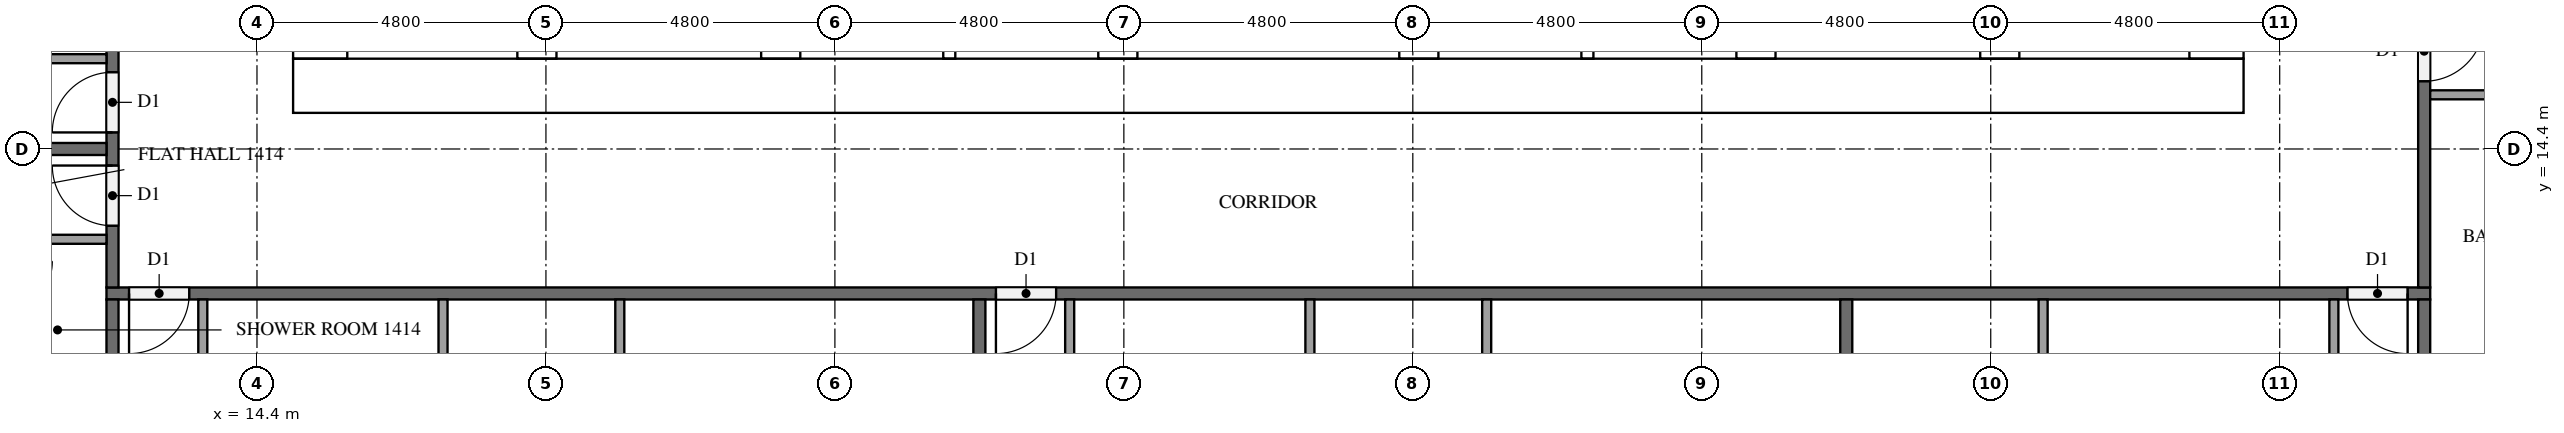
"""IFC4 building model, lengths in metres.
Left out: names, types, materials, properties, quantities, classifications, styles, units other than length and angle.
Written with IfcOpenShell. Run it as: python <this file> out.ifc"""

import sys

from ifc_helpers import new_model, si_unit, direction, frame, frame_2d, origin, place, context, subcontext, project, spatial, rectangle, extrude, element, fill, save


model = new_model("IFC4")
c1 = context("Model", 3, precision=1e-05, world=origin(), true_north=direction((0.0, 1.0)))
c2 = subcontext(c1, "Body", "Model", "MODEL_VIEW")
j1 = project(units=[si_unit("LENGTHUNIT", "METRE"), si_unit("PLANEANGLEUNIT", "RADIAN")], contexts=[c1])
p1 = place(None, origin())
s1 = spatial("IfcSite", under=j1, at=p1, CompositionType="ELEMENT")
p2 = place(p1, origin())
s2 = spatial("IfcBuilding", under=s1, at=p2, CompositionType="ELEMENT")
p3 = place(p2, frame((0.0, 0.0, 59.3)))
s3 = spatial("IfcBuildingStorey", under=s2, at=p3, CompositionType="ELEMENT", Elevation=59.3)
p4 = place(p3, frame((15.0, 15.45, 0.0), z_axis=(0.0, 0.0, 1.0), x_axis=(1.0, 0.0, 0.0)))
e1 = element("IfcWall", 1, at=p4, inside=s3, PredefinedType="SHEAR", context=c2, shape_type="SweptSolid", body=[
    extrude(rectangle(XDim=32.4, YDim=0.9, at=frame_2d((16.2, 0.0))), origin(), (0.0, 0.0, 1.0), 3.2),
])
p5 = place(p4, frame((15.3, 0.0, 0.0)))
e2 = element("IfcOpeningElement", 2, at=p5, cuts=e1, PredefinedType="OPENING", context=c2, shape_type="SweptSolid", body=[
    extrude(rectangle(XDim=1.8, YDim=2.1, at=frame_2d((0.9, 1.05))), frame((0.0, 0.46, 0.0), z_axis=(0.0, -1.0, 0.0), x_axis=(1.0, 0.0, 0.0)), (0.0, 0.0, 1.0), 0.92),
])
p6 = place(p3, frame((15.45, 15.9, 0.0), z_axis=(0.0, 0.0, 1.0), x_axis=(0.0, 1.0, 0.0)))
e3 = element("IfcWall", 3, at=p6, inside=s3, PredefinedType="SHEAR", context=c2, shape_type="SweptSolid", body=[
    extrude(rectangle(XDim=21.0, YDim=0.9, at=frame_2d((10.5, 0.0))), origin(), (0.0, 0.0, 1.0), 3.2),
])
p7 = place(p6, frame((4.86, 0.0, 0.0)))
e4 = element("IfcOpeningElement", 4, at=p7, cuts=e3, PredefinedType="OPENING", context=c2, shape_type="SweptSolid", body=[
    extrude(rectangle(XDim=1.2, YDim=2.1, at=frame_2d((0.6, 1.05))), frame((0.0, 0.46, 0.0), z_axis=(0.0, -1.0, 0.0), x_axis=(1.0, 0.0, 0.0)), (0.0, 0.0, 1.0), 0.92),
])
p8 = place(p3, frame((46.95, 15.9, 0.0), z_axis=(0.0, 0.0, 1.0), x_axis=(0.0, 1.0, 0.0)))
e5 = element("IfcWall", 5, at=p8, inside=s3, PredefinedType="SHEAR", context=c2, shape_type="SweptSolid", body=[
    extrude(rectangle(XDim=21.0, YDim=0.9, at=frame_2d((10.5, 0.0))), origin(), (0.0, 0.0, 1.0), 3.2),
])
p9 = place(p8, frame((10.2, 0.0, 0.0)))
e6 = element("IfcOpeningElement", 6, at=p9, cuts=e5, PredefinedType="OPENING", context=c2, shape_type="SweptSolid", body=[
    extrude(rectangle(XDim=1.2, YDim=2.1, at=frame_2d((0.6, 1.05))), frame((0.0, 0.46, 0.0), z_axis=(0.0, -1.0, 0.0), x_axis=(1.0, 0.0, 0.0)), (0.0, 0.0, 1.0), 0.92),
])
p10 = place(p3, frame((19.05, 15.9, 0.0), z_axis=(0.0, 0.0, 1.0), x_axis=(0.0, 1.0, 0.0)))
e7 = element("IfcWall", 7, at=p10, inside=s3, PredefinedType="SHEAR", context=c2, shape_type="SweptSolid", body=[
    extrude(rectangle(XDim=15.025, YDim=0.65, at=frame_2d((7.513, 0.0))), origin(), (0.0, 0.0, 1.0), 3.2),
])
p11 = place(p10, frame((9.55, 0.0, 0.0)))
e8 = element("IfcOpeningElement", 8, at=p11, cuts=e7, PredefinedType="OPENING", context=c2, shape_type="SweptSolid", body=[
    extrude(rectangle(XDim=1.1, YDim=2.1, at=frame_2d((0.55, 1.05))), frame((0.0, 0.335, 0.0), z_axis=(0.0, -1.0, 0.0), x_axis=(1.0, 0.0, 0.0)), (0.0, 0.0, 1.0), 0.67),
])
p12 = place(p10, frame((13.05, 0.0, 0.0)))
e9 = element("IfcOpeningElement", 9, at=p12, cuts=e7, PredefinedType="OPENING", context=c2, shape_type="SweptSolid", body=[
    extrude(rectangle(XDim=1.1, YDim=2.1, at=frame_2d((0.55, 1.05))), frame((0.0, 0.335, 0.0), z_axis=(0.0, -1.0, 0.0), x_axis=(1.0, 0.0, 0.0)), (0.0, 0.0, 1.0), 0.67),
])
p13 = place(p10, frame((0.3, 0.0, 0.0)))
e10 = element("IfcOpeningElement", 10, at=p13, cuts=e7, PredefinedType="OPENING", context=c2, shape_type="SweptSolid", body=[
    extrude(rectangle(XDim=1.2, YDim=2.1, at=frame_2d((0.6, 1.05))), frame((0.0, 0.335, 0.0), z_axis=(0.0, -1.0, 0.0), x_axis=(1.0, 0.0, 0.0)), (0.0, 0.0, 1.0), 0.67),
])
p14 = place(p3, frame((23.1, 15.9, 0.0), z_axis=(0.0, 0.0, 1.0), x_axis=(0.0, 1.0, 0.0)))
e11 = element("IfcWall", 11, at=p14, inside=s3, PredefinedType="SHEAR", context=c2, shape_type="SweptSolid", body=[
    extrude(rectangle(XDim=21.0, YDim=0.65, at=frame_2d((10.5, 0.0))), origin(), (0.0, 0.0, 1.0), 3.2),
])
p15 = place(p3, frame((39.3, 15.9, 0.0), z_axis=(0.0, 0.0, 1.0), x_axis=(0.0, 1.0, 0.0)))
e12 = element("IfcWall", 12, at=p15, inside=s3, PredefinedType="SHEAR", context=c2, shape_type="SweptSolid", body=[
    extrude(rectangle(XDim=8.35, YDim=0.65, at=frame_2d((4.175, 0.0))), origin(), (0.0, 0.0, 1.0), 3.2),
])
p16 = place(p3, frame((43.35, 15.9, 0.0), z_axis=(0.0, 0.0, 1.0), x_axis=(0.0, 1.0, 0.0)))
e13 = element("IfcWall", 13, at=p16, inside=s3, PredefinedType="SHEAR", context=c2, shape_type="SweptSolid", body=[
    extrude(rectangle(XDim=8.35, YDim=0.65, at=frame_2d((4.175, 0.0))), origin(), (0.0, 0.0, 1.0), 3.2),
])
p17 = place(p16, frame((0.3, 0.0, 0.0)))
e14 = element("IfcOpeningElement", 14, at=p17, cuts=e13, PredefinedType="OPENING", context=c2, shape_type="SweptSolid", body=[
    extrude(rectangle(XDim=1.2, YDim=2.1, at=frame_2d((0.6, 1.05))), frame((0.0, 0.335, 0.0), z_axis=(0.0, -1.0, 0.0), x_axis=(1.0, 0.0, 0.0)), (0.0, 0.0, 1.0), 0.67),
])
for number, where, z_axis, x_axis in (
    (15, (28.7, 15.9, 0.0), (0.0, 0.0, 1.0), (0.0, 1.0, 0.0)),
    (16, (33.7, 15.9, 0.0), (0.0, 0.0, 1.0), (0.0, 1.0, 0.0)),
):
    element("IfcWall", number, at=place(p3, frame(where, z_axis=z_axis, x_axis=x_axis)), inside=s3, PredefinedType="SHEAR", context=c2, shape_type="SweptSolid", body=[
        extrude(rectangle(XDim=2.525, YDim=0.65, at=frame_2d((1.263, 0.0))), origin(), (0.0, 0.0, 1.0), 3.2),
    ])
for number, where, z_axis, x_axis in (
    (17, (25.9, 15.9, 0.0), (0.0, 0.0, 1.0), (0.0, 1.0, 0.0)),
    (18, (36.5, 15.9, 0.0), (0.0, 0.0, 1.0), (0.0, 1.0, 0.0)),
):
    element("IfcWall", number, at=place(p3, frame(where, z_axis=z_axis, x_axis=x_axis)), inside=s3, PredefinedType="SOLIDWALL", context=c2, shape_type="SweptSolid", body=[
        extrude(rectangle(XDim=2.525, YDim=0.2, at=frame_2d((1.263, 0.0))), origin(), (0.0, 0.0, 1.0), 3.2),
    ])
p18 = place(p3, frame((50.5, 12.0, 0.0), z_axis=(0.0, 0.0, 1.0), x_axis=(-1.0, 0.0, 0.0)))
e19 = element("IfcWall", 19, at=p18, inside=s3, PredefinedType="PARTITIONING", context=c2, shape_type="SweptSolid", body=[
    extrude(rectangle(XDim=38.6, YDim=0.2, at=frame_2d((19.3, 0.0))), origin(), (0.0, 0.0, 1.0), 3.2),
])
p19 = place(p18, frame((37.225, 0.0, 0.0)))
e20 = element("IfcOpeningElement", 20, at=p19, cuts=e19, PredefinedType="OPENING", context=c2, shape_type="SweptSolid", body=[
    extrude(rectangle(XDim=1.0, YDim=2.1, at=frame_2d((0.5, 1.05))), frame((0.0, 0.11, 0.0), z_axis=(0.0, -1.0, 0.0), x_axis=(1.0, 0.0, 0.0)), (0.0, 0.0, 1.0), 0.22),
])
p20 = place(p18, frame((22.825, 0.0, 0.0)))
e21 = element("IfcOpeningElement", 21, at=p20, cuts=e19, PredefinedType="OPENING", context=c2, shape_type="SweptSolid", body=[
    extrude(rectangle(XDim=1.0, YDim=2.1, at=frame_2d((0.5, 1.05))), frame((0.0, 0.11, 0.0), z_axis=(0.0, -1.0, 0.0), x_axis=(1.0, 0.0, 0.0)), (0.0, 0.0, 1.0), 0.22),
])
p21 = place(p18, frame((0.375, 0.0, 0.0)))
e22 = element("IfcOpeningElement", 22, at=p21, cuts=e19, PredefinedType="OPENING", context=c2, shape_type="SweptSolid", body=[
    extrude(rectangle(XDim=1.0, YDim=2.1, at=frame_2d((0.5, 1.05))), frame((0.0, 0.11, 0.0), z_axis=(0.0, -1.0, 0.0), x_axis=(1.0, 0.0, 0.0)), (0.0, 0.0, 1.0), 0.22),
])
p22 = place(p3, frame((50.4, 40.7, 0.0), z_axis=(0.0, 0.0, 1.0), x_axis=(0.0, -1.0, 0.0)))
e23 = element("IfcWall", 23, at=p22, inside=s3, PredefinedType="PARTITIONING", context=c2, shape_type="SweptSolid", body=[
    extrude(rectangle(XDim=28.6, YDim=0.2, at=frame_2d((14.3, 0.0))), origin(), (0.0, 0.0, 1.0), 3.2),
])
p23 = place(p22, frame((24.175, 0.0, 0.0)))
e24 = element("IfcOpeningElement", 24, at=p23, cuts=e23, PredefinedType="OPENING", context=c2, shape_type="SweptSolid", body=[
    extrude(rectangle(XDim=1.0, YDim=2.1, at=frame_2d((0.5, 1.05))), frame((0.0, 0.11, 0.0), z_axis=(0.0, -1.0, 0.0), x_axis=(1.0, 0.0, 0.0)), (0.0, 0.0, 1.0), 0.22),
])
p24 = place(p22, frame((22.625, 0.0, 0.0)))
e25 = element("IfcOpeningElement", 25, at=p24, cuts=e23, PredefinedType="OPENING", context=c2, shape_type="SweptSolid", body=[
    extrude(rectangle(XDim=1.0, YDim=2.1, at=frame_2d((0.5, 1.05))), frame((0.0, 0.11, 0.0), z_axis=(0.0, -1.0, 0.0), x_axis=(1.0, 0.0, 0.0)), (0.0, 0.0, 1.0), 0.22),
])
p25 = place(p22, frame((10.625, 0.0, 0.0)))
e26 = element("IfcOpeningElement", 26, at=p25, cuts=e23, PredefinedType="OPENING", context=c2, shape_type="SweptSolid", body=[
    extrude(rectangle(XDim=1.0, YDim=2.1, at=frame_2d((0.5, 1.05))), frame((0.0, 0.11, 0.0), z_axis=(0.0, -1.0, 0.0), x_axis=(1.0, 0.0, 0.0)), (0.0, 0.0, 1.0), 0.22),
])
p26 = place(p3, frame((12.0, 12.1, 0.0), z_axis=(0.0, 0.0, 1.0), x_axis=(0.0, 1.0, 0.0)))
e27 = element("IfcWall", 27, at=p26, inside=s3, PredefinedType="PARTITIONING", context=c2, shape_type="SweptSolid", body=[
    extrude(rectangle(XDim=28.6, YDim=0.2, at=frame_2d((14.3, 0.0))), origin(), (0.0, 0.0, 1.0), 3.2),
])
p27 = place(p26, frame((19.375, 0.0, 0.0)))
e28 = element("IfcOpeningElement", 28, at=p27, cuts=e27, PredefinedType="OPENING", context=c2, shape_type="SweptSolid", body=[
    extrude(rectangle(XDim=1.0, YDim=2.1, at=frame_2d((0.5, 1.05))), frame((0.0, 0.11, 0.0), z_axis=(0.0, -1.0, 0.0), x_axis=(1.0, 0.0, 0.0)), (0.0, 0.0, 1.0), 0.22),
])
p28 = place(p26, frame((12.175, 0.0, 0.0)))
e29 = element("IfcOpeningElement", 29, at=p28, cuts=e27, PredefinedType="OPENING", context=c2, shape_type="SweptSolid", body=[
    extrude(rectangle(XDim=1.0, YDim=2.1, at=frame_2d((0.5, 1.05))), frame((0.0, 0.11, 0.0), z_axis=(0.0, -1.0, 0.0), x_axis=(1.0, 0.0, 0.0)), (0.0, 0.0, 1.0), 0.22),
])
p29 = place(p26, frame((2.575, 0.0, 0.0)))
e30 = element("IfcOpeningElement", 30, at=p29, cuts=e27, PredefinedType="OPENING", context=c2, shape_type="SweptSolid", body=[
    extrude(rectangle(XDim=1.0, YDim=2.1, at=frame_2d((0.5, 1.05))), frame((0.0, 0.11, 0.0), z_axis=(0.0, -1.0, 0.0), x_axis=(1.0, 0.0, 0.0)), (0.0, 0.0, 1.0), 0.22),
])
p30 = place(p26, frame((1.025, 0.0, 0.0)))
e31 = element("IfcOpeningElement", 31, at=p30, cuts=e27, PredefinedType="OPENING", context=c2, shape_type="SweptSolid", body=[
    extrude(rectangle(XDim=1.0, YDim=2.1, at=frame_2d((0.5, 1.05))), frame((0.0, 0.11, 0.0), z_axis=(0.0, -1.0, 0.0), x_axis=(1.0, 0.0, 0.0)), (0.0, 0.0, 1.0), 0.22),
])
for number, where, z_axis, x_axis in (
    (32, (26.4, 11.9, 0.0), (0.0, 0.0, 1.0), (0.0, -1.0, 0.0)),
    (33, (12.0, 0.1, 0.0), (0.0, 0.0, 1.0), (0.0, 1.0, 0.0)),
    (34, (40.8, 11.9, 0.0), (0.0, 0.0, 1.0), (0.0, -1.0, 0.0)),
    (35, (50.4, 11.9, 0.0), (0.0, 0.0, 1.0), (0.0, -1.0, 0.0)),
):
    element("IfcWall", number, at=place(p3, frame(where, z_axis=z_axis, x_axis=x_axis)), inside=s3, PredefinedType="PARTITIONING", context=c2, shape_type="SweptSolid", body=[
        extrude(rectangle(XDim=11.8, YDim=0.2, at=frame_2d((5.9, 0.0))), origin(), (0.0, 0.0, 1.0), 3.2),
    ])
p31 = place(p3, frame((5.225, 14.4, 0.0), z_axis=(0.0, 0.0, 1.0), x_axis=(1.0, 0.0, 0.0)))
e36 = element("IfcWall", 36, at=p31, inside=s3, PredefinedType="PARTITIONING", context=c2, shape_type="SweptSolid", body=[
    extrude(rectangle(XDim=6.675, YDim=0.2, at=frame_2d((3.337, 0.0))), origin(), (0.0, 0.0, 1.0), 3.2),
])
for number, where, z_axis, x_axis in (
    (37, (17.49, 11.9, 0.0), (0.0, 0.0, 1.0), (0.0, -1.0, 0.0)),
    (38, (20.427, 11.9, 0.0), (0.0, 0.0, 1.0), (0.0, -1.0, 0.0)),
):
    element("IfcWall", number, at=place(p3, frame(where, z_axis=z_axis, x_axis=x_axis)), inside=s3, PredefinedType="PARTITIONING", context=c2, shape_type="SweptSolid", body=[
        extrude(rectangle(XDim=4.325, YDim=0.15, at=frame_2d((2.163, 0.0))), origin(), (0.0, 0.0, 1.0), 3.2),
    ])
p32 = place(p3, frame((13.5, 11.9, 0.0), z_axis=(0.0, 0.0, 1.0), x_axis=(0.0, -1.0, 0.0)))
e39 = element("IfcWall", 39, at=p32, inside=s3, PredefinedType="PARTITIONING", context=c2, shape_type="SweptSolid", body=[
    extrude(rectangle(XDim=4.475, YDim=0.15, at=frame_2d((2.237, 0.0))), origin(), (0.0, 0.0, 1.0), 3.2),
])
for number, where, z_axis, x_axis in (
    (40, (31.89, 11.9, 0.0), (0.0, 0.0, 1.0), (0.0, -1.0, 0.0)),
    (41, (34.827, 11.9, 0.0), (0.0, 0.0, 1.0), (0.0, -1.0, 0.0)),
):
    element("IfcWall", number, at=place(p3, frame(where, z_axis=z_axis, x_axis=x_axis)), inside=s3, PredefinedType="PARTITIONING", context=c2, shape_type="SweptSolid", body=[
        extrude(rectangle(XDim=3.125, YDim=0.15, at=frame_2d((1.562, 0.0))), origin(), (0.0, 0.0, 1.0), 3.2),
    ])
p33 = place(p3, frame((27.9, 11.9, 0.0), z_axis=(0.0, 0.0, 1.0), x_axis=(0.0, -1.0, 0.0)))
e42 = element("IfcWall", 42, at=p33, inside=s3, PredefinedType="PARTITIONING", context=c2, shape_type="SweptSolid", body=[
    extrude(rectangle(XDim=3.275, YDim=0.15, at=frame_2d((1.637, 0.0))), origin(), (0.0, 0.0, 1.0), 3.2),
])
p34 = place(p3, frame((44.07, 11.9, 0.0), z_axis=(0.0, 0.0, 1.0), x_axis=(0.0, -1.0, 0.0)))
e43 = element("IfcWall", 43, at=p34, inside=s3, PredefinedType="PARTITIONING", context=c2, shape_type="SweptSolid", body=[
    extrude(rectangle(XDim=3.575, YDim=0.15, at=frame_2d((1.788, 0.0))), origin(), (0.0, 0.0, 1.0), 3.2),
])
p35 = place(p3, frame((48.9, 11.9, 0.0), z_axis=(0.0, 0.0, 1.0), x_axis=(0.0, -1.0, 0.0)))
e44 = element("IfcWall", 44, at=p35, inside=s3, PredefinedType="PARTITIONING", context=c2, shape_type="SweptSolid", body=[
    extrude(rectangle(XDim=3.725, YDim=0.15, at=frame_2d((1.862, 0.0))), origin(), (0.0, 0.0, 1.0), 3.2),
])
p36 = place(p3, frame((50.5, 15.3, 0.0), z_axis=(0.0, 0.0, 1.0), x_axis=(1.0, 0.0, 0.0)))
e45 = element("IfcWall", 45, at=p36, inside=s3, PredefinedType="PARTITIONING", context=c2, shape_type="SweptSolid", body=[
    extrude(rectangle(XDim=3.725, YDim=0.15, at=frame_2d((1.863, 0.0))), origin(), (0.0, 0.0, 1.0), 3.2),
])
p37 = place(p3, frame((11.9, 15.9, 0.0), z_axis=(0.0, 0.0, 1.0), x_axis=(-1.0, 0.0, 0.0)))
e46 = element("IfcWall", 46, at=p37, inside=s3, PredefinedType="PARTITIONING", context=c2, shape_type="SweptSolid", body=[
    extrude(rectangle(XDim=1.925, YDim=0.15, at=frame_2d((0.962, 0.0))), origin(), (0.0, 0.0, 1.0), 3.2),
])
p38 = place(p3, frame((11.9, 12.9, 0.0), z_axis=(0.0, 0.0, 1.0), x_axis=(-1.0, 0.0, 0.0)))
e47 = element("IfcWall", 47, at=p38, inside=s3, PredefinedType="PARTITIONING", context=c2, shape_type="SweptSolid", body=[
    extrude(rectangle(XDim=1.775, YDim=0.15, at=frame_2d((0.887, 0.0))), origin(), (0.0, 0.0, 1.0), 3.2),
])
p39 = place(p5, frame((1.8, 0.0, 0.0), z_axis=(0.0, 0.0, 1.0), x_axis=(-1.0, 0.0, 0.0)))
e48 = element("IfcDoor", 48, at=p39, inside=s3, OperationType="DOUBLE_DOOR_SINGLE_SWING", PredefinedType="DOOR", context=c2, shape_type="SweptSolid", body=[
    extrude(rectangle(XDim=1.8, YDim=2.1, at=frame_2d((0.9, 1.05))), frame((0.0, 0.025, 0.0), z_axis=(0.0, -1.0, 0.0), x_axis=(1.0, 0.0, 0.0)), (0.0, 0.0, 1.0), 0.05),
])
fill(e2, e48)
p40 = place(p19, origin())
e49 = element("IfcDoor", 49, at=p40, inside=s3, OperationType="SINGLE_SWING_RIGHT", PredefinedType="DOOR", context=c2, shape_type="SweptSolid", body=[
    extrude(rectangle(XDim=1.0, YDim=2.1, at=frame_2d((0.5, 1.05))), frame((0.0, 0.025, 0.0), z_axis=(0.0, -1.0, 0.0), x_axis=(1.0, 0.0, 0.0)), (0.0, 0.0, 1.0), 0.05),
])
fill(e20, e49)
p41 = place(p20, origin())
e50 = element("IfcDoor", 50, at=p41, inside=s3, OperationType="SINGLE_SWING_RIGHT", PredefinedType="DOOR", context=c2, shape_type="SweptSolid", body=[
    extrude(rectangle(XDim=1.0, YDim=2.1, at=frame_2d((0.5, 1.05))), frame((0.0, 0.025, 0.0), z_axis=(0.0, -1.0, 0.0), x_axis=(1.0, 0.0, 0.0)), (0.0, 0.0, 1.0), 0.05),
])
fill(e21, e50)
p42 = place(p21, origin())
e51 = element("IfcDoor", 51, at=p42, inside=s3, OperationType="SINGLE_SWING_LEFT", PredefinedType="DOOR", context=c2, shape_type="SweptSolid", body=[
    extrude(rectangle(XDim=1.0, YDim=2.1, at=frame_2d((0.5, 1.05))), frame((0.0, 0.025, 0.0), z_axis=(0.0, -1.0, 0.0), x_axis=(1.0, 0.0, 0.0)), (0.0, 0.0, 1.0), 0.05),
])
fill(e22, e51)
p43 = place(p23, origin())
e52 = element("IfcDoor", 52, at=p43, inside=s3, OperationType="SINGLE_SWING_LEFT", PredefinedType="DOOR", context=c2, shape_type="SweptSolid", body=[
    extrude(rectangle(XDim=1.0, YDim=2.1, at=frame_2d((0.5, 1.05))), frame((0.0, 0.025, 0.0), z_axis=(0.0, -1.0, 0.0), x_axis=(1.0, 0.0, 0.0)), (0.0, 0.0, 1.0), 0.05),
])
fill(e24, e52)
p44 = place(p29, origin())
e53 = element("IfcDoor", 53, at=p44, inside=s3, OperationType="SINGLE_SWING_LEFT", PredefinedType="DOOR", context=c2, shape_type="SweptSolid", body=[
    extrude(rectangle(XDim=1.0, YDim=2.1, at=frame_2d((0.5, 1.05))), frame((0.0, 0.025, 0.0), z_axis=(0.0, -1.0, 0.0), x_axis=(1.0, 0.0, 0.0)), (0.0, 0.0, 1.0), 0.05),
])
fill(e30, e53)
p45 = place(p30, origin())
e54 = element("IfcDoor", 54, at=p45, inside=s3, OperationType="SINGLE_SWING_RIGHT", PredefinedType="DOOR", context=c2, shape_type="SweptSolid", body=[
    extrude(rectangle(XDim=1.0, YDim=2.1, at=frame_2d((0.5, 1.05))), frame((0.0, 0.025, 0.0), z_axis=(0.0, -1.0, 0.0), x_axis=(1.0, 0.0, 0.0)), (0.0, 0.0, 1.0), 0.05),
])
fill(e31, e54)
save(model, sys.argv[1])
